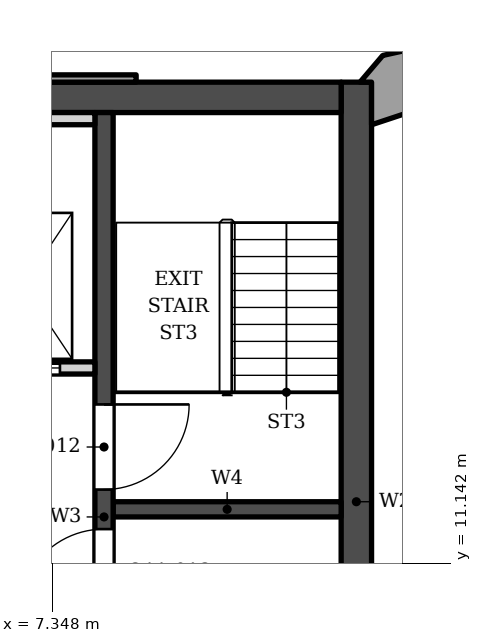
"""IFC4 building model, lengths in metres.
Left out: names, types, materials, properties, quantities, classifications, styles, units other than length and angle.
Written with IfcOpenShell. Run it as: python <this file> out.ifc"""

import sys

from ifc_helpers import new_model, si_unit, direction, frame, frame_2d, origin, place, context, subcontext, project, spatial, polyline, rectangle, outline, extrude, element, fill, save


model = new_model("IFC4")
c1 = context("Model", 3, precision=1e-05, world=origin(), true_north=direction((0.0, 1.0)))
c2 = subcontext(c1, "Body", "Model", "MODEL_VIEW")
j1 = project(units=[si_unit("LENGTHUNIT", "METRE"), si_unit("PLANEANGLEUNIT", "RADIAN")], contexts=[c1])
p1 = place(None, origin())
s1 = spatial("IfcSite", under=j1, at=p1, CompositionType="ELEMENT")
p2 = place(p1, origin())
s2 = spatial("IfcBuilding", under=s1, at=p2, CompositionType="ELEMENT")
p3 = place(p2, frame((0.0, 0.0, 271.6)))
s3 = spatial("IfcBuildingStorey", under=s2, at=p3, CompositionType="ELEMENT", Elevation=271.6)
p4 = place(p3, frame((-12.1, 18.802, 0.0), z_axis=(0.0, 0.0, 1.0), x_axis=(1.0, 0.0, 0.0)))
e1 = element("IfcWall", 1, at=p4, inside=s3, PredefinedType="SHEAR", context=c2, shape_type="SweptSolid", body=[
    extrude(rectangle(XDim=24.2, YDim=0.5, at=frame_2d((12.1, 0.0))), origin(), (0.0, 0.0, 1.0), 3.9),
])
p5 = place(p3, frame((12.35, 5.253, 0.0), z_axis=(0.0, 0.0, 1.0), x_axis=(0.0, 1.0, 0.0)))
e2 = element("IfcWall", 2, at=p5, inside=s3, PredefinedType="SHEAR", context=c2, shape_type="SweptSolid", body=[
    extrude(rectangle(XDim=13.8, YDim=0.5, at=frame_2d((6.9, 0.0))), origin(), (0.0, 0.0, 1.0), 3.9),
])
p6 = place(p3, frame((8.2, 5.253, 0.0), z_axis=(0.0, 0.0, 1.0), x_axis=(0.0, 1.0, 0.0)))
e3 = element("IfcWall", 3, at=p6, inside=s3, PredefinedType="SHEAR", context=c2, shape_type="SweptSolid", body=[
    extrude(rectangle(XDim=13.3, YDim=0.3, at=frame_2d((6.65, 0.0))), origin(), (0.0, 0.0, 1.0), 3.9),
])
p7 = place(p6, frame((7.1, 0.0, 0.0)))
e4 = element("IfcOpeningElement", 4, at=p7, cuts=e3, PredefinedType="OPENING", context=c2, shape_type="SweptSolid", body=[
    extrude(rectangle(XDim=1.4, YDim=2.1, at=frame_2d((0.7, 1.05))), frame((0.0, 0.16, 0.0), z_axis=(0.0, -1.0, 0.0), x_axis=(1.0, 0.0, 0.0)), (0.0, 0.0, 1.0), 0.32),
])
p8 = place(p6, frame((5.05, 0.0, 0.0)))
e5 = element("IfcOpeningElement", 5, at=p8, cuts=e3, PredefinedType="OPENING", context=c2, shape_type="SweptSolid", body=[
    extrude(rectangle(XDim=1.4, YDim=2.1, at=frame_2d((0.7, 1.05))), frame((0.0, 0.16, 0.0), z_axis=(0.0, -1.0, 0.0), x_axis=(1.0, 0.0, 0.0)), (0.0, 0.0, 1.0), 0.32),
])
p9 = place(p3, frame((8.35, 12.028, 0.0), z_axis=(0.0, 0.0, 1.0), x_axis=(1.0, 0.0, 0.0)))
e6 = element("IfcWall", 6, at=p9, inside=s3, PredefinedType="SHEAR", context=c2, shape_type="SweptSolid", body=[
    extrude(rectangle(XDim=3.75, YDim=0.25, at=frame_2d((1.875, 0.0))), origin(), (0.0, 0.0, 1.0), 3.9),
])
p10 = place(p3, origin())
e7 = element("IfcWall", 7, at=p10, inside=s3, PredefinedType="SOLIDWALL", context=c2, shape_type="SweptSolid", body=[
    extrude(outline(polyline([(5.128, 19.173), (5.128, 19.052), (8.729, 19.052), (8.729, 19.173), (5.128, 19.173)])), origin(), (0.0, 0.0, 1.0), 3.0),
])
p11 = place(p3, origin())
e8 = element("IfcWall", 8, at=p11, inside=s3, PredefinedType="SOLIDWALL", context=c2, shape_type="SweptSolid", body=[
    extrude(outline(polyline([(14.201, 18.883), (14.008, 19.762), (12.784, 19.492), (12.41, 19.052), (12.6, 19.052), (12.6, 18.352), (14.201, 18.883)])), origin(), (0.0, 0.0, 1.0), 3.0),
])
p12 = place(p3, frame((5.3, 14.353, 0.0), z_axis=(0.0, 0.0, 1.0), x_axis=(1.0, 0.0, 0.0)))
e9 = element("IfcWall", 9, at=p12, inside=s3, PredefinedType="SOLIDWALL", context=c2, shape_type="SweptSolid", body=[
    extrude(rectangle(XDim=2.75, YDim=0.2, at=frame_2d((1.375, 0.0))), origin(), (0.0, 0.0, 1.0), 3.73),
])
p13 = place(p12, frame((0.975, 0.0, 0.0)))
e10 = element("IfcOpeningElement", 10, at=p13, cuts=e9, PredefinedType="OPENING", context=c2, shape_type="SweptSolid", body=[
    extrude(rectangle(XDim=1.2, YDim=2.1, at=frame_2d((0.6, 1.05))), frame((0.0, 0.11, 0.0), z_axis=(0.0, -1.0, 0.0), x_axis=(1.0, 0.0, 0.0)), (0.0, 0.0, 1.0), 0.22),
])
p14 = place(p3, frame((5.5, 18.453, 0.0), z_axis=(0.0, 0.0, 1.0), x_axis=(1.0, 0.0, 0.0)))
e11 = element("IfcWall", 11, at=p14, inside=s3, PredefinedType="SOLIDWALL", context=c2, shape_type="SweptSolid", body=[
    extrude(rectangle(XDim=2.55, YDim=0.2, at=frame_2d((1.275, 0.0))), origin(), (0.0, 0.0, 1.0), 3.73),
])
p15 = place(p13, origin())
e12 = element("IfcDoor", 12, at=p15, inside=s3, OperationType="DOUBLE_DOOR_SLIDING", PredefinedType="DOOR", context=c2, shape_type="SweptSolid", body=[
    extrude(rectangle(XDim=1.2, YDim=2.1, at=frame_2d((0.6, 1.05))), frame((0.0, 0.025, 0.0), z_axis=(0.0, -1.0, 0.0), x_axis=(1.0, 0.0, 0.0)), (0.0, 0.0, 1.0), 0.05),
])
fill(e10, e12)
p16 = place(p7, origin())
e13 = element("IfcDoor", 13, at=p16, inside=s3, OperationType="SINGLE_SWING_RIGHT", PredefinedType="DOOR", context=c2, shape_type="SweptSolid", body=[
    extrude(rectangle(XDim=1.4, YDim=2.1, at=frame_2d((0.7, 1.05))), frame((0.0, 0.025, 0.0), z_axis=(0.0, -1.0, 0.0), x_axis=(1.0, 0.0, 0.0)), (0.0, 0.0, 1.0), 0.05),
])
fill(e4, e13)
p17 = place(p8, origin())
e14 = element("IfcDoor", 14, at=p17, inside=s3, OperationType="SINGLE_SWING_LEFT", PredefinedType="DOOR", context=c2, shape_type="SweptSolid", body=[
    extrude(rectangle(XDim=1.4, YDim=2.1, at=frame_2d((0.7, 1.05))), frame((0.0, 0.025, 0.0), z_axis=(0.0, -1.0, 0.0), x_axis=(1.0, 0.0, 0.0)), (0.0, 0.0, 1.0), 0.05),
])
fill(e5, e14)
save(model, sys.argv[1])
